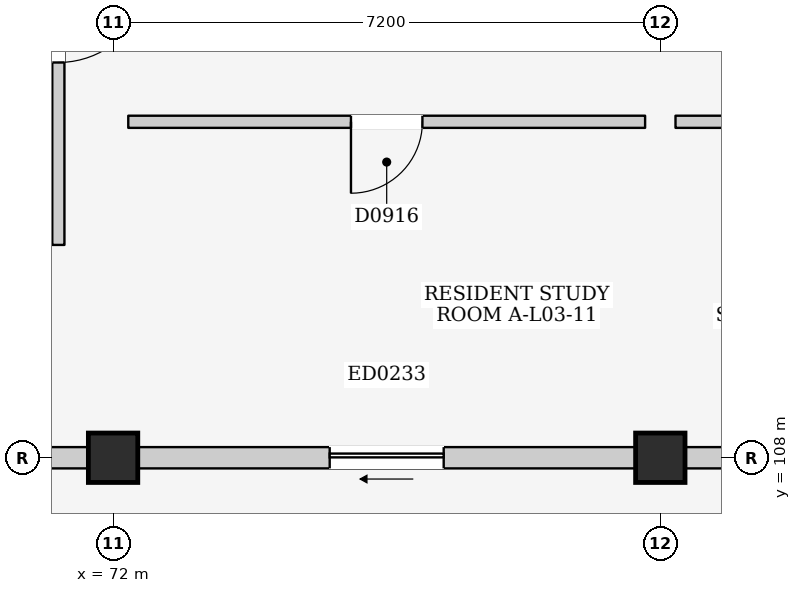
"""IFC4 building model, lengths in metres.
Left out: names, types, materials, properties, quantities, classifications, styles, units other than length and angle.
Written with IfcOpenShell. Run it as: python <this file> out.ifc"""

import sys

from ifc_helpers import new_model, si_unit, direction, frame, frame_2d, origin, origin_2d, place, context, subcontext, project, spatial, rectangle, extrude, element, fill, save


model = new_model("IFC4")
c1 = context("Model", 3, precision=1e-05, world=origin(), true_north=direction((0.0, 1.0)))
c2 = subcontext(c1, "Body", "Model", "MODEL_VIEW")
j1 = project(units=[si_unit("LENGTHUNIT", "METRE"), si_unit("PLANEANGLEUNIT", "RADIAN")], contexts=[c1])
p1 = place(None, origin())
s1 = spatial("IfcSite", under=j1, at=p1, CompositionType="ELEMENT")
p2 = place(p1, origin())
s2 = spatial("IfcBuilding", under=s1, at=p2, CompositionType="ELEMENT")
p3 = place(p2, frame((0.0, 0.0, 12.2)))
s3 = spatial("IfcBuildingStorey", under=s2, at=p3, CompositionType="ELEMENT", Elevation=12.2)
for number, where, z_axis, x_axis in (
    (1, (72.0, 108.0, 0.0), (0.0, 0.0, 1.0), (1.0, 0.0, 0.0)),
    (2, (79.2, 108.0, 0.0), (0.0, 0.0, 1.0), (1.0, 0.0, 0.0)),
):
    element("IfcColumn", number, at=place(p3, frame(where, z_axis=z_axis, x_axis=x_axis)), inside=s3, PredefinedType="COLUMN", context=c2, shape_type="SweptSolid", body=[
        extrude(rectangle(XDim=0.65, YDim=0.65, at=origin_2d()), origin(), (0.0, 0.0, 1.0), 3.2),
    ])
p4 = place(p3, frame((65.125, 108.0, 0.0), z_axis=(0.0, 0.0, 1.0), x_axis=(1.0, 0.0, 0.0)))
e3 = element("IfcWall", 3, at=p4, inside=s3, PredefinedType="ELEMENTEDWALL", context=c2, shape_type="SweptSolid", body=[
    extrude(rectangle(XDim=6.55, YDim=0.28, at=frame_2d((3.275, 0.0))), origin(), (0.0, 0.0, 1.0), 2.315),
])
p5 = place(p4, frame((2.775, 0.0, 1.2)))
e4 = element("IfcOpeningElement", 4, at=p5, cuts=e3, PredefinedType="OPENING", context=c2, shape_type="SweptSolid", body=[
    extrude(rectangle(XDim=1.0, YDim=0.9, at=frame_2d((0.5, 0.45))), frame((0.0, 0.155, 0.0), z_axis=(0.0, -1.0, 0.0), x_axis=(1.0, 0.0, 0.0)), (0.0, 0.0, 1.0), 0.31),
])
p6 = place(p3, frame((72.325, 108.0, 0.0), z_axis=(0.0, 0.0, 1.0), x_axis=(1.0, 0.0, 0.0)))
e5 = element("IfcWall", 5, at=p6, inside=s3, PredefinedType="ELEMENTEDWALL", context=c2, shape_type="SweptSolid", body=[
    extrude(rectangle(XDim=6.55, YDim=0.28, at=frame_2d((3.275, 0.0))), origin(), (0.0, 0.0, 1.0), 2.315),
])
p7 = place(p6, frame((2.525, 0.0, 0.0)))
e6 = element("IfcOpeningElement", 6, at=p7, cuts=e5, PredefinedType="OPENING", context=c2, shape_type="SweptSolid", body=[
    extrude(rectangle(XDim=1.5, YDim=2.12, at=frame_2d((0.75, 1.06))), frame((0.0, 0.155, 0.0), z_axis=(0.0, -1.0, 0.0), x_axis=(1.0, 0.0, 0.0)), (0.0, 0.0, 1.0), 0.31),
])
p8 = place(p3, frame((79.525, 108.0, 0.0), z_axis=(0.0, 0.0, 1.0), x_axis=(1.0, 0.0, 0.0)))
e7 = element("IfcWall", 7, at=p8, inside=s3, PredefinedType="ELEMENTEDWALL", context=c2, shape_type="SweptSolid", body=[
    extrude(rectangle(XDim=6.55, YDim=0.28, at=frame_2d((3.275, 0.0))), origin(), (0.0, 0.0, 1.0), 2.315),
])
p9 = place(p8, frame((2.525, 0.0, 0.0)))
e8 = element("IfcOpeningElement", 8, at=p9, cuts=e7, PredefinedType="OPENING", context=c2, shape_type="SweptSolid", body=[
    extrude(rectangle(XDim=1.5, YDim=2.12, at=frame_2d((0.75, 1.06))), frame((0.0, 0.155, 0.0), z_axis=(0.0, -1.0, 0.0), x_axis=(1.0, 0.0, 0.0)), (0.0, 0.0, 1.0), 0.31),
])
p10 = place(p3, frame((71.28, 110.8, 0.0), z_axis=(0.0, 0.0, 1.0), x_axis=(0.0, 1.0, 0.0)))
e9 = element("IfcWall", 9, at=p10, inside=s3, PredefinedType="PARTITIONING", context=c2, shape_type="SweptSolid", body=[
    extrude(rectangle(XDim=4.32, YDim=0.16, at=frame_2d((2.16, 0.0))), origin(), (0.0, 0.0, 1.0), 2.98),
])
p11 = place(p10, frame((2.4, 0.0, 0.0)))
e10 = element("IfcOpeningElement", 10, at=p11, cuts=e9, PredefinedType="OPENING", context=c2, shape_type="SweptSolid", body=[
    extrude(rectangle(XDim=1.2, YDim=2.2, at=frame_2d((0.6, 1.1))), frame((0.0, 0.095, 0.0), z_axis=(0.0, -1.0, 0.0), x_axis=(1.0, 0.0, 0.0)), (0.0, 0.0, 1.0), 0.19),
])
p12 = place(p3, frame((72.2, 112.42, 0.0), z_axis=(0.0, 0.0, 1.0), x_axis=(1.0, 0.0, 0.0)))
e11 = element("IfcWall", 11, at=p12, inside=s3, PredefinedType="PARTITIONING", context=c2, shape_type="SweptSolid", body=[
    extrude(rectangle(XDim=6.8, YDim=0.16, at=frame_2d((3.4, 0.0))), origin(), (0.0, 0.0, 1.0), 2.98),
])
p13 = place(p12, frame((2.93, 0.0, 0.0)))
e12 = element("IfcOpeningElement", 12, at=p13, cuts=e11, PredefinedType="OPENING", context=c2, shape_type="SweptSolid", body=[
    extrude(rectangle(XDim=0.94, YDim=2.12, at=frame_2d((0.47, 1.06))), frame((0.0, 0.095, 0.0), z_axis=(0.0, -1.0, 0.0), x_axis=(1.0, 0.0, 0.0)), (0.0, 0.0, 1.0), 0.19),
])
p14 = place(p3, frame((79.4, 112.42, 0.0), z_axis=(0.0, 0.0, 1.0), x_axis=(1.0, 0.0, 0.0)))
e13 = element("IfcWall", 13, at=p14, inside=s3, PredefinedType="PARTITIONING", context=c2, shape_type="SweptSolid", body=[
    extrude(rectangle(XDim=6.8, YDim=0.16, at=frame_2d((3.4, 0.0))), origin(), (0.0, 0.0, 1.0), 2.98),
])
p15 = place(p14, frame((2.93, 0.0, 0.0)))
e14 = element("IfcOpeningElement", 14, at=p15, cuts=e13, PredefinedType="OPENING", context=c2, shape_type="SweptSolid", body=[
    extrude(rectangle(XDim=0.94, YDim=2.12, at=frame_2d((0.47, 1.06))), frame((0.0, 0.095, 0.0), z_axis=(0.0, -1.0, 0.0), x_axis=(1.0, 0.0, 0.0)), (0.0, 0.0, 1.0), 0.19),
])
p16 = place(p7, frame((1.5, 0.0, 0.0), z_axis=(0.0, 0.0, 1.0), x_axis=(-1.0, 0.0, 0.0)))
e15 = element("IfcDoor", 15, at=p16, inside=s3, OperationType="SLIDING_TO_LEFT", PredefinedType="DOOR", context=c2, shape_type="SweptSolid", body=[
    extrude(rectangle(XDim=1.5, YDim=2.12, at=frame_2d((0.75, 1.06))), frame((0.0, 0.025, 0.0), z_axis=(0.0, -1.0, 0.0), x_axis=(1.0, 0.0, 0.0)), (0.0, 0.0, 1.0), 0.05),
])
fill(e6, e15)
p17 = place(p11, frame((1.2, 0.0, 0.0), z_axis=(0.0, 0.0, 1.0), x_axis=(-1.0, 0.0, 0.0)))
e16 = element("IfcDoor", 16, at=p17, inside=s3, OperationType="SINGLE_SWING_LEFT", PredefinedType="DOOR", context=c2, shape_type="SweptSolid", body=[
    extrude(rectangle(XDim=1.2, YDim=2.2, at=frame_2d((0.6, 1.1))), frame((0.0, 0.025, 0.0), z_axis=(0.0, -1.0, 0.0), x_axis=(1.0, 0.0, 0.0)), (0.0, 0.0, 1.0), 0.05),
])
fill(e10, e16)
p18 = place(p13, frame((0.94, 0.0, 0.0), z_axis=(0.0, 0.0, 1.0), x_axis=(-1.0, 0.0, 0.0)))
e17 = element("IfcDoor", 17, at=p18, inside=s3, OperationType="SINGLE_SWING_RIGHT", PredefinedType="DOOR", context=c2, shape_type="SweptSolid", body=[
    extrude(rectangle(XDim=0.94, YDim=2.12, at=frame_2d((0.47, 1.06))), frame((0.0, 0.025, 0.0), z_axis=(0.0, -1.0, 0.0), x_axis=(1.0, 0.0, 0.0)), (0.0, 0.0, 1.0), 0.05),
])
fill(e12, e17)
save(model, sys.argv[1])
